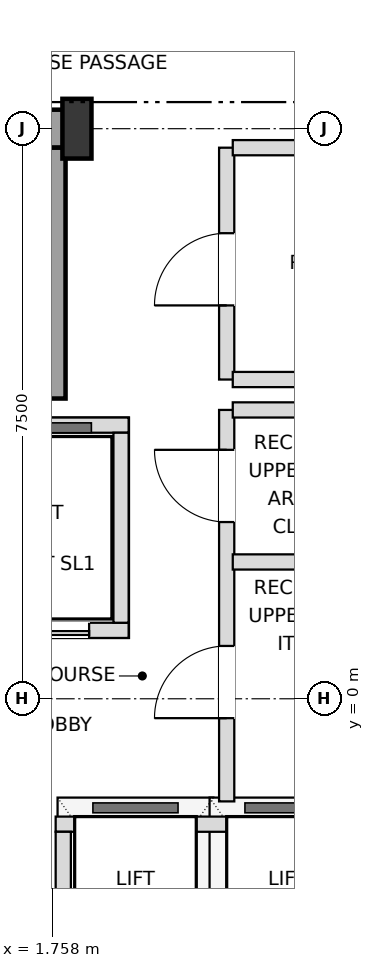
"""IFC4 building model, lengths in metres.
Left out: names, types, materials, properties, quantities, classifications, styles, units other than length and angle.
Written with IfcOpenShell. Run it as: python <this file> out.ifc"""

import sys

from ifc_helpers import new_model, si_unit, direction, frame, frame_2d, origin, origin_2d, place, context, subcontext, project, spatial, rectangle, i_section, extrude, element, fill, save


model = new_model("IFC4")
c1 = context("Model", 3, precision=1e-05, world=origin(), true_north=direction((0.0, 1.0)))
c2 = subcontext(c1, "Body", "Model", "MODEL_VIEW")
j1 = project(units=[si_unit("LENGTHUNIT", "METRE"), si_unit("PLANEANGLEUNIT", "RADIAN")], contexts=[c1])
p1 = place(None, origin())
s1 = spatial("IfcSite", under=j1, at=p1, CompositionType="ELEMENT")
p2 = place(p1, origin())
s2 = spatial("IfcBuilding", under=s1, at=p2, CompositionType="ELEMENT")
p3 = place(p2, frame((0.0, 0.0, 287.1)))
s3 = spatial("IfcBuildingStorey", under=s2, at=p3, CompositionType="ELEMENT", Elevation=287.1)
p4 = place(p3, frame((2.08, 7.5, 0.0), z_axis=(0.0, 0.0, 1.0), x_axis=(1.0, 0.0, 0.0)))
e1 = element("IfcColumn", 1, at=p4, inside=s3, PredefinedType="COLUMN", context=c2, shape_type="SweptSolid", body=[
    extrude(i_section(OverallWidth=0.382, OverallDepth=0.786, WebThickness=0.02, FlangeThickness=0.033, at=origin_2d()), origin(), (0.0, 0.0, 1.0), 3.6),
])
p5 = place(p3, frame((0.0, 7.5, 0.0), z_axis=(0.0, 0.0, 1.0), x_axis=(1.0, 0.0, 0.0)))
e2 = element("IfcWall", 2, at=p5, inside=s3, PredefinedType="SHEAR", context=c2, shape_type="SweptSolid", body=[
    extrude(rectangle(XDim=2.08, YDim=0.5, at=frame_2d((1.04, 0.0))), origin(), (0.0, 0.0, 1.0), 3.38),
])
p6 = place(p3, frame((1.73, 3.95, 0.0), z_axis=(0.0, 0.0, 1.0), x_axis=(0.0, 1.0, 0.0)))
e3 = element("IfcWall", 3, at=p6, inside=s3, PredefinedType="SHEAR", context=c2, shape_type="SweptSolid", body=[
    extrude(rectangle(XDim=3.3, YDim=0.4, at=frame_2d((1.65, 0.0))), origin(), (0.0, 0.0, 1.0), 3.38),
])
p7 = place(p3, frame((-2.82, 0.9, 0.0), z_axis=(0.0, 0.0, 1.0), x_axis=(1.0, 0.0, 0.0)))
e4 = element("IfcWall", 4, at=p7, inside=s3, PredefinedType="SOLIDWALL", context=c2, shape_type="SweptSolid", body=[
    extrude(rectangle(XDim=5.58, YDim=0.2, at=frame_2d((2.79, 0.0))), origin(), (0.0, 0.0, 1.0), 3.38),
])
p8 = place(p7, frame((0.49, 0.0, 0.0)))
e5 = element("IfcOpeningElement", 5, at=p8, cuts=e4, PredefinedType="OPENING", context=c2, shape_type="SweptSolid", body=[
    extrude(rectangle(XDim=1.1, YDim=2.15, at=frame_2d((0.55, 1.075))), frame((0.0, 0.11, 0.0), z_axis=(0.0, -1.0, 0.0), x_axis=(1.0, 0.0, 0.0)), (0.0, 0.0, 1.0), 0.22),
])
p9 = place(p7, frame((2.17, 0.0, 0.0)))
e6 = element("IfcOpeningElement", 6, at=p9, cuts=e4, PredefinedType="OPENING", context=c2, shape_type="SweptSolid", body=[
    extrude(rectangle(XDim=1.1, YDim=2.15, at=frame_2d((0.55, 1.075))), frame((0.0, 0.11, 0.0), z_axis=(0.0, -1.0, 0.0), x_axis=(1.0, 0.0, 0.0)), (0.0, 0.0, 1.0), 0.22),
])
p10 = place(p7, frame((3.86, 0.0, 0.0)))
e7 = element("IfcOpeningElement", 7, at=p10, cuts=e4, PredefinedType="OPENING", context=c2, shape_type="SweptSolid", body=[
    extrude(rectangle(XDim=1.2, YDim=2.2, at=frame_2d((0.6, 1.1))), frame((0.0, 0.11, 0.0), z_axis=(0.0, -1.0, 0.0), x_axis=(1.0, 0.0, 0.0)), (0.0, 0.0, 1.0), 0.22),
])
p11 = place(p3, frame((-2.82, 3.6, 0.0), z_axis=(0.0, 0.0, 1.0), x_axis=(1.0, 0.0, 0.0)))
e8 = element("IfcWall", 8, at=p11, inside=s3, PredefinedType="SOLIDWALL", context=c2, shape_type="SweptSolid", body=[
    extrude(rectangle(XDim=5.58, YDim=0.2, at=frame_2d((2.79, 0.0))), origin(), (0.0, 0.0, 1.0), 3.38),
])
p12 = place(p3, frame((2.66, 1.0, 0.0), z_axis=(0.0, 0.0, 1.0), x_axis=(0.0, 1.0, 0.0)))
e9 = element("IfcWall", 9, at=p12, inside=s3, PredefinedType="SOLIDWALL", context=c2, shape_type="SweptSolid", body=[
    extrude(rectangle(XDim=2.5, YDim=0.2, at=frame_2d((1.25, 0.0))), origin(), (0.0, 0.0, 1.0), 3.38),
])
p13 = place(p3, frame((1.8, -1.65, 0.0), z_axis=(0.0, 0.0, 1.0), x_axis=(1.0, 0.0, 0.0)))
e10 = element("IfcWall", 10, at=p13, inside=s3, PredefinedType="SOLIDWALL", context=c2, shape_type="SweptSolid", body=[
    extrude(rectangle(XDim=4.1, YDim=0.2, at=frame_2d((2.05, 0.0))), origin(), (0.0, 0.0, 1.0), 3.38),
])
p14 = place(p3, frame((1.9, -3.75, 0.0), z_axis=(0.0, 0.0, 1.0), x_axis=(0.0, 1.0, 0.0)))
e11 = element("IfcWall", 11, at=p14, inside=s3, PredefinedType="SOLIDWALL", context=c2, shape_type="SweptSolid", body=[
    extrude(rectangle(XDim=2.0, YDim=0.2, at=frame_2d((1.0, 0.0))), origin(), (0.0, 0.0, 1.0), 3.38),
])
p15 = place(p3, frame((4.05, -1.35, 0.0), z_axis=(0.0, 0.0, 1.0), x_axis=(0.0, 1.0, 0.0)))
e12 = element("IfcWall", 12, at=p15, inside=s3, PredefinedType="SOLIDWALL", context=c2, shape_type="SweptSolid", body=[
    extrude(rectangle(XDim=5.15, YDim=0.2, at=frame_2d((2.575, 0.0))), origin(), (0.0, 0.0, 1.0), 3.38),
])
p16 = place(p15, frame((1.095, 0.0, 0.0)))
e13 = element("IfcOpeningElement", 13, at=p16, cuts=e12, PredefinedType="OPENING", context=c2, shape_type="SweptSolid", body=[
    extrude(rectangle(XDim=0.95, YDim=2.15, at=frame_2d((0.475, 1.075))), frame((0.0, 0.11, 0.0), z_axis=(0.0, -1.0, 0.0), x_axis=(1.0, 0.0, 0.0)), (0.0, 0.0, 1.0), 0.22),
])
p17 = place(p15, frame((3.675, 0.0, 0.0)))
e14 = element("IfcOpeningElement", 14, at=p17, cuts=e12, PredefinedType="OPENING", context=c2, shape_type="SweptSolid", body=[
    extrude(rectangle(XDim=0.95, YDim=2.15, at=frame_2d((0.475, 1.075))), frame((0.0, 0.11, 0.0), z_axis=(0.0, -1.0, 0.0), x_axis=(1.0, 0.0, 0.0)), (0.0, 0.0, 1.0), 0.22),
])
p18 = place(p3, frame((4.05, 4.2, 0.0), z_axis=(0.0, 0.0, 1.0), x_axis=(0.0, 1.0, 0.0)))
e15 = element("IfcWall", 15, at=p18, inside=s3, PredefinedType="SOLIDWALL", context=c2, shape_type="SweptSolid", body=[
    extrude(rectangle(XDim=3.05, YDim=0.2, at=frame_2d((1.525, 0.0))), origin(), (0.0, 0.0, 1.0), 3.38),
])
p19 = place(p18, frame((0.975, 0.0, 0.0)))
e16 = element("IfcOpeningElement", 16, at=p19, cuts=e15, PredefinedType="OPENING", context=c2, shape_type="SweptSolid", body=[
    extrude(rectangle(XDim=0.95, YDim=2.15, at=frame_2d((0.475, 1.075))), frame((0.0, 0.11, 0.0), z_axis=(0.0, -1.0, 0.0), x_axis=(1.0, 0.0, 0.0)), (0.0, 0.0, 1.0), 0.22),
])
for number, where, z_axis, x_axis in (
    (17, (4.13, 1.8, 0.0), (0.0, 0.0, 1.0), (1.0, 0.0, 0.0)),
    (18, (4.13, 3.8, 0.0), (0.0, 0.0, 1.0), (1.0, 0.0, 0.0)),
):
    element("IfcWall", number, at=place(p3, frame(where, z_axis=z_axis, x_axis=x_axis)), inside=s3, PredefinedType="SOLIDWALL", context=c2, shape_type="SweptSolid", body=[
        extrude(rectangle(XDim=2.04, YDim=0.2, at=frame_2d((1.02, 0.0))), origin(), (0.0, 0.0, 1.0), 3.38),
    ])
for number, where, z_axis, x_axis in (
    (19, (4.13, 4.2, 0.0), (0.0, 0.0, 1.0), (1.0, 0.0, 0.0)),
    (20, (4.13, 7.25, 0.0), (0.0, 0.0, 1.0), (1.0, 0.0, 0.0)),
):
    element("IfcWall", number, at=place(p3, frame(where, z_axis=z_axis, x_axis=x_axis)), inside=s3, PredefinedType="SOLIDWALL", context=c2, shape_type="SweptSolid", body=[
        extrude(rectangle(XDim=2.07, YDim=0.2, at=frame_2d((1.035, 0.0))), origin(), (0.0, 0.0, 1.0), 3.38),
    ])
p20 = place(p10, origin())
e21 = element("IfcDoor", 21, at=p20, inside=s3, OperationType="DOUBLE_DOOR_SLIDING", PredefinedType="DOOR", context=c2, shape_type="SweptSolid", body=[
    extrude(rectangle(XDim=1.2, YDim=2.2, at=frame_2d((0.6, 1.1))), frame((0.0, 0.025, 0.0), z_axis=(0.0, -1.0, 0.0), x_axis=(1.0, 0.0, 0.0)), (0.0, 0.0, 1.0), 0.05),
])
fill(e7, e21)
p21 = place(p16, origin())
e22 = element("IfcDoor", 22, at=p21, inside=s3, OperationType="SINGLE_SWING_LEFT", PredefinedType="DOOR", context=c2, shape_type="SweptSolid", body=[
    extrude(rectangle(XDim=0.95, YDim=2.15, at=frame_2d((0.475, 1.075))), frame((0.0, 0.025, 0.0), z_axis=(0.0, -1.0, 0.0), x_axis=(1.0, 0.0, 0.0)), (0.0, 0.0, 1.0), 0.05),
])
fill(e13, e22)
p22 = place(p17, origin())
e23 = element("IfcDoor", 23, at=p22, inside=s3, OperationType="SINGLE_SWING_RIGHT", PredefinedType="DOOR", context=c2, shape_type="SweptSolid", body=[
    extrude(rectangle(XDim=0.95, YDim=2.15, at=frame_2d((0.475, 1.075))), frame((0.0, 0.025, 0.0), z_axis=(0.0, -1.0, 0.0), x_axis=(1.0, 0.0, 0.0)), (0.0, 0.0, 1.0), 0.05),
])
fill(e14, e23)
p23 = place(p19, origin())
e24 = element("IfcDoor", 24, at=p23, inside=s3, OperationType="SINGLE_SWING_LEFT", PredefinedType="DOOR", context=c2, shape_type="SweptSolid", body=[
    extrude(rectangle(XDim=0.95, YDim=2.15, at=frame_2d((0.475, 1.075))), frame((0.0, 0.025, 0.0), z_axis=(0.0, -1.0, 0.0), x_axis=(1.0, 0.0, 0.0)), (0.0, 0.0, 1.0), 0.05),
])
fill(e16, e24)
save(model, sys.argv[1])
